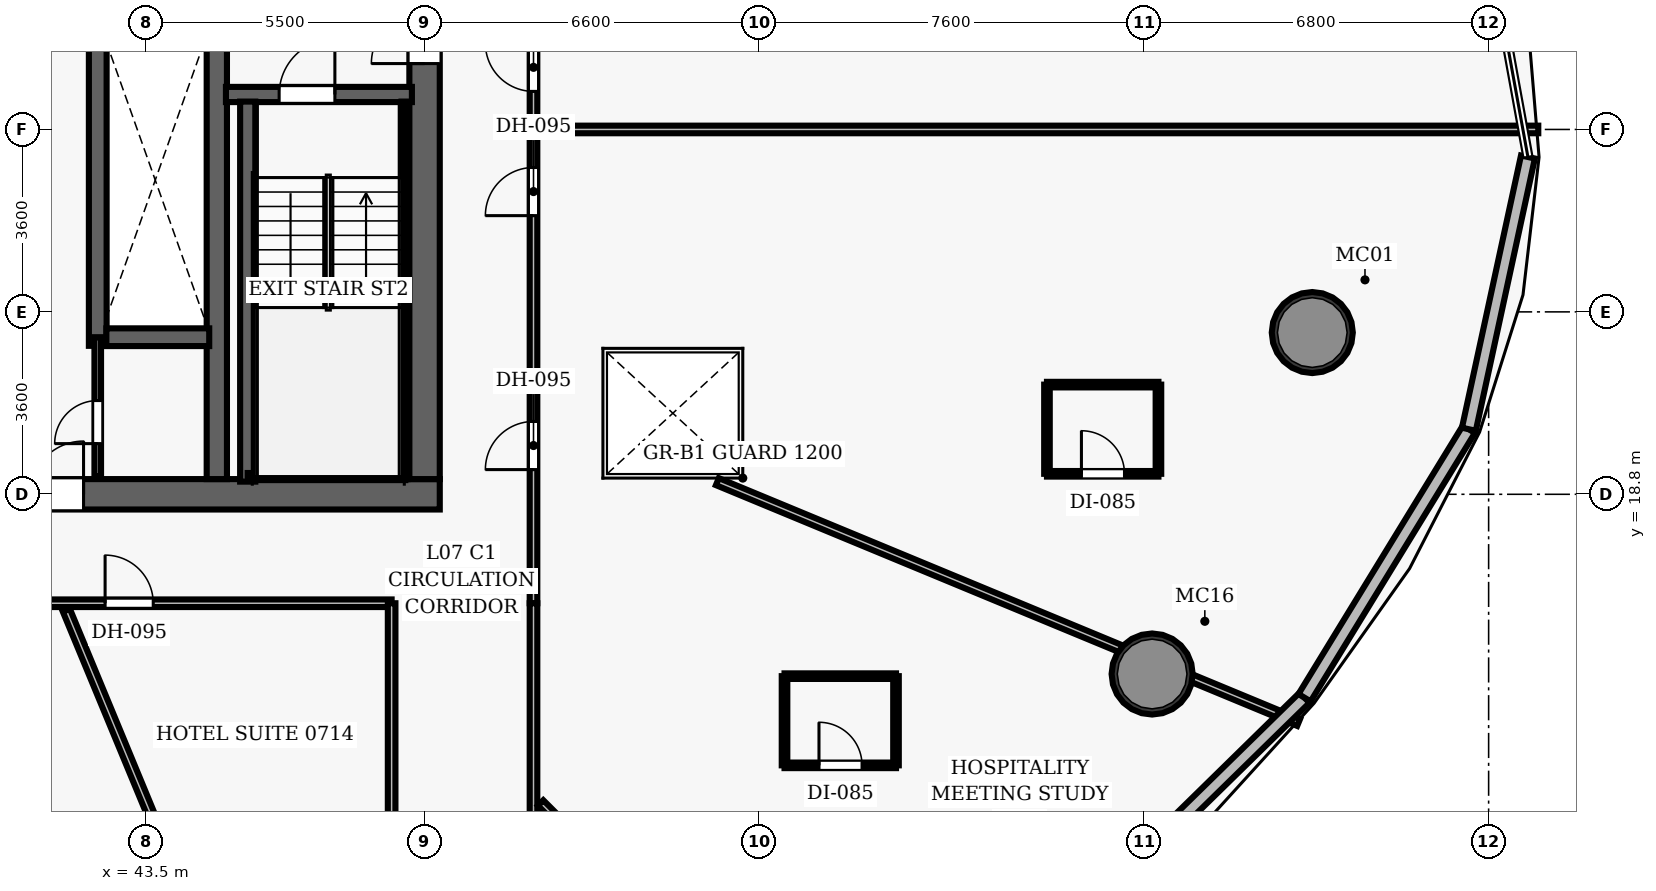
"""IFC4 building model, lengths in metres.
Left out: names, types, materials, properties, quantities, classifications, styles, units other than length and angle.
Written with IfcOpenShell. Run it as: python <this file> out.ifc"""

import sys

from ifc_helpers import new_model, si_unit, direction, frame, frame_2d, origin, origin_2d, place, context, subcontext, project, spatial, rectangle, hollow_circle, extrude, element, fill, save


model = new_model("IFC4")
c1 = context("Model", 3, precision=1e-05, world=origin(), true_north=direction((0.0, 1.0)))
c2 = subcontext(c1, "Body", "Model", "MODEL_VIEW")
j1 = project(units=[si_unit("LENGTHUNIT", "METRE"), si_unit("PLANEANGLEUNIT", "RADIAN")], contexts=[c1])
p1 = place(None, origin())
s1 = spatial("IfcSite", under=j1, at=p1, CompositionType="ELEMENT")
p2 = place(p1, origin())
s2 = spatial("IfcBuilding", under=s1, at=p2, CompositionType="ELEMENT")
p3 = place(p2, frame((0.0, 0.0, 41.4)))
s3 = spatial("IfcBuildingStorey", under=s2, at=p3, CompositionType="ELEMENT", Elevation=41.4)
p4 = place(p3, frame((26.7, 18.8, 0.0), z_axis=(0.0, 0.0, 1.0), x_axis=(1.0, 0.0, 0.0)))
e1 = element("IfcWall", 1, at=p4, inside=s3, PredefinedType="SHEAR", context=c2, shape_type="SweptSolid", body=[
    extrude(rectangle(XDim=22.6, YDim=0.6, at=frame_2d((11.3, 0.0))), origin(), (0.0, 0.0, 1.0), 3.5),
])
p5 = place(p4, frame((14.52, 0.0, 0.0)))
e2 = element("IfcOpeningElement", 2, at=p5, cuts=e1, PredefinedType="OPENING", context=c2, shape_type="SweptSolid", body=[
    extrude(rectangle(XDim=1.05, YDim=2.15, at=frame_2d((0.525, 1.075))), frame((0.0, 0.31, 0.0), z_axis=(0.0, -1.0, 0.0), x_axis=(1.0, 0.0, 0.0)), (0.0, 0.0, 1.0), 0.62),
])
p6 = place(p3, frame((49.0, 19.1, 0.0), z_axis=(0.0, 0.0, 1.0), x_axis=(0.0, 1.0, 0.0)))
e3 = element("IfcWall", 3, at=p6, inside=s3, PredefinedType="SHEAR", context=c2, shape_type="SweptSolid", body=[
    extrude(rectangle(XDim=13.8, YDim=0.6, at=frame_2d((6.9, 0.0))), origin(), (0.0, 0.0, 1.0), 3.5),
])
p7 = place(p6, frame((8.2, 0.0, 0.0)))
e4 = element("IfcOpeningElement", 4, at=p7, cuts=e3, PredefinedType="OPENING", context=c2, shape_type="SweptSolid", body=[
    extrude(rectangle(XDim=1.05, YDim=2.15, at=frame_2d((0.525, 1.075))), frame((0.0, 0.31, 0.0), z_axis=(0.0, -1.0, 0.0), x_axis=(1.0, 0.0, 0.0)), (0.0, 0.0, 1.0), 0.62),
])
p8 = place(p3, frame((44.9, 19.1, 0.0), z_axis=(0.0, 0.0, 1.0), x_axis=(0.0, 1.0, 0.0)))
e5 = element("IfcWall", 5, at=p8, inside=s3, PredefinedType="SHEAR", context=c2, shape_type="SweptSolid", body=[
    extrude(rectangle(XDim=13.8, YDim=0.4, at=frame_2d((6.9, 0.0))), origin(), (0.0, 0.0, 1.0), 3.5),
])
for number, where, z_axis, x_axis in (
    (6, (66.52, 21.992, 0.0), (0.0, 0.0, 1.0), (1.0, 0.0, 0.0)),
    (7, (63.359, 15.254, 0.0), (0.0, 0.0, 1.0), (1.0, 0.0, 0.0)),
):
    element("IfcColumn", number, at=place(p3, frame(where, z_axis=z_axis, x_axis=x_axis)), inside=s3, PredefinedType="COLUMN", context=c2, shape_type="SweptSolid", body=[
        extrude(hollow_circle(Radius=0.8, WallThickness=0.06, at=origin_2d()), origin(), (0.0, 0.0, 1.0), 3.5),
    ])
p9 = place(p3, frame((45.08, 26.69, 0.0), z_axis=(0.0, 0.0, 1.0), x_axis=(1.0, 0.0, 0.0)))
e8 = element("IfcWall", 8, at=p9, inside=s3, PredefinedType="SHEAR", context=c2, shape_type="SweptSolid", body=[
    extrude(rectangle(XDim=3.67, YDim=0.3, at=frame_2d((1.835, 0.0))), origin(), (0.0, 0.0, 1.0), 3.5),
])
p10 = place(p9, frame((1.05, 0.0, 0.0)))
e9 = element("IfcOpeningElement", 9, at=p10, cuts=e8, PredefinedType="OPENING", context=c2, shape_type="SweptSolid", body=[
    extrude(rectangle(XDim=1.1, YDim=2.15, at=frame_2d((0.55, 1.075))), frame((0.0, 0.16, 0.0), z_axis=(0.0, -1.0, 0.0), x_axis=(1.0, 0.0, 0.0)), (0.0, 0.0, 1.0), 0.32),
])
p11 = place(p3, frame((45.51, 19.05, 0.0), z_axis=(0.0, 0.0, 1.0), x_axis=(0.0, 1.0, 0.0)))
e10 = element("IfcWall", 10, at=p11, inside=s3, PredefinedType="SHEAR", context=c2, shape_type="SweptSolid", body=[
    extrude(rectangle(XDim=7.5, YDim=0.3, at=frame_2d((3.75, 0.0))), origin(), (0.0, 0.0, 1.0), 3.5),
])
p12 = place(p3, frame((48.605, 19.1, 0.0), z_axis=(0.0, 0.0, 1.0), x_axis=(0.0, 1.0, 0.0)))
e11 = element("IfcWall", 11, at=p12, inside=s3, PredefinedType="SHEAR", context=c2, shape_type="SweptSolid", body=[
    extrude(rectangle(XDim=7.45, YDim=0.12, at=frame_2d((3.725, 0.0))), origin(), (0.0, 0.0, 1.0), 3.5),
])
p13 = place(p3, frame((45.51, 19.16, 0.0), z_axis=(0.0, 0.0, 1.0), x_axis=(1.0, 0.0, 0.0)))
e12 = element("IfcWall", 12, at=p13, inside=s3, PredefinedType="SHEAR", context=c2, shape_type="SweptSolid", body=[
    extrude(rectangle(XDim=3.095, YDim=0.12, at=frame_2d((1.547, 0.0))), origin(), (0.0, 0.0, 1.0), 3.5),
])
p14 = place(p3, frame((42.55, 21.73, 0.0), z_axis=(0.0, 0.0, 1.0), x_axis=(0.0, 1.0, 0.0)))
e13 = element("IfcWall", 13, at=p14, inside=s3, PredefinedType="SHEAR", context=c2, shape_type="SweptSolid", body=[
    extrude(rectangle(XDim=6.54, YDim=0.35, at=frame_2d((3.27, 0.0))), origin(), (0.0, 0.0, 1.0), 2.6),
])
p15 = place(p3, frame((42.72, 21.9, 0.0), z_axis=(0.0, 0.0, 1.0), x_axis=(1.0, 0.0, 0.0)))
e14 = element("IfcWall", 14, at=p15, inside=s3, PredefinedType="SHEAR", context=c2, shape_type="SweptSolid", body=[
    extrude(rectangle(XDim=2.03, YDim=0.35, at=frame_2d((1.015, 0.0))), origin(), (0.0, 0.0, 1.0), 2.6),
])
p16 = place(p3, frame((42.55, 19.15, 0.0), z_axis=(0.0, 0.0, 1.0), x_axis=(0.0, 1.0, 0.0)))
e15 = element("IfcWall", 15, at=p16, inside=s3, PredefinedType="PARTITIONING", context=c2, shape_type="SweptSolid", body=[
    extrude(rectangle(XDim=2.75, YDim=0.13, at=frame_2d((1.375, 0.0))), origin(), (0.0, 0.0, 1.0), 2.6),
])
p17 = place(p16, frame((0.65, 0.0, 0.0)))
e16 = element("IfcOpeningElement", 16, at=p17, cuts=e15, PredefinedType="OPENING", context=c2, shape_type="SweptSolid", body=[
    extrude(rectangle(XDim=0.85, YDim=2.1, at=frame_2d((0.425, 1.05))), frame((0.0, 0.075, 0.0), z_axis=(0.0, -1.0, 0.0), x_axis=(1.0, 0.0, 0.0)), (0.0, 0.0, 1.0), 0.15),
])
p18 = place(p3, frame((24.85, 16.65, 0.0), z_axis=(0.0, 0.0, 1.0), x_axis=(1.0, 0.0, 0.0)))
e17 = element("IfcWall", 17, at=p18, inside=s3, PredefinedType="PARTITIONING", context=c2, shape_type="SweptSolid", body=[
    extrude(rectangle(XDim=23.5, YDim=0.15, at=frame_2d((11.75, 0.0))), origin(), (0.0, 0.0, 1.0), 2.6),
])
p19 = place(p18, frame((7.505, 0.0, 0.0)))
e18 = element("IfcOpeningElement", 18, at=p19, cuts=e17, PredefinedType="OPENING", context=c2, shape_type="SweptSolid", body=[
    extrude(rectangle(XDim=0.95, YDim=2.15, at=frame_2d((0.475, 1.075))), frame((0.0, 0.085, 0.0), z_axis=(0.0, -1.0, 0.0), x_axis=(1.0, 0.0, 0.0)), (0.0, 0.0, 1.0), 0.17),
])
p20 = place(p18, frame((11.391, 0.0, 0.0)))
e19 = element("IfcOpeningElement", 19, at=p20, cuts=e17, PredefinedType="OPENING", context=c2, shape_type="SweptSolid", body=[
    extrude(rectangle(XDim=0.95, YDim=2.15, at=frame_2d((0.475, 1.075))), frame((0.0, 0.085, 0.0), z_axis=(0.0, -1.0, 0.0), x_axis=(1.0, 0.0, 0.0)), (0.0, 0.0, 1.0), 0.17),
])
p21 = place(p18, frame((14.636, 0.0, 0.0)))
e20 = element("IfcOpeningElement", 20, at=p21, cuts=e17, PredefinedType="OPENING", context=c2, shape_type="SweptSolid", body=[
    extrude(rectangle(XDim=0.95, YDim=2.15, at=frame_2d((0.475, 1.075))), frame((0.0, 0.085, 0.0), z_axis=(0.0, -1.0, 0.0), x_axis=(1.0, 0.0, 0.0)), (0.0, 0.0, 1.0), 0.17),
])
p22 = place(p18, frame((17.845, 0.0, 0.0)))
e21 = element("IfcOpeningElement", 21, at=p22, cuts=e17, PredefinedType="OPENING", context=c2, shape_type="SweptSolid", body=[
    extrude(rectangle(XDim=0.95, YDim=2.15, at=frame_2d((0.475, 1.075))), frame((0.0, 0.085, 0.0), z_axis=(0.0, -1.0, 0.0), x_axis=(1.0, 0.0, 0.0)), (0.0, 0.0, 1.0), 0.17),
])
p23 = place(p3, frame((51.15, 16.65, 0.0), z_axis=(0.0, 0.0, 1.0), x_axis=(0.0, 1.0, 0.0)))
e22 = element("IfcWall", 22, at=p23, inside=s3, PredefinedType="PARTITIONING", context=c2, shape_type="SweptSolid", body=[
    extrude(rectangle(XDim=15.9, YDim=0.15, at=frame_2d((7.95, 0.0))), origin(), (0.0, 0.0, 1.0), 2.6),
])
p24 = place(p23, frame((10.101, 0.0, 0.0)))
e23 = element("IfcOpeningElement", 23, at=p24, cuts=e22, PredefinedType="OPENING", context=c2, shape_type="SweptSolid", body=[
    extrude(rectangle(XDim=0.95, YDim=2.15, at=frame_2d((0.475, 1.075))), frame((0.0, 0.085, 0.0), z_axis=(0.0, -1.0, 0.0), x_axis=(1.0, 0.0, 0.0)), (0.0, 0.0, 1.0), 0.17),
])
p25 = place(p23, frame((2.637, 0.0, 0.0)))
e24 = element("IfcOpeningElement", 24, at=p25, cuts=e22, PredefinedType="OPENING", context=c2, shape_type="SweptSolid", body=[
    extrude(rectangle(XDim=0.95, YDim=2.15, at=frame_2d((0.475, 1.075))), frame((0.0, 0.085, 0.0), z_axis=(0.0, -1.0, 0.0), x_axis=(1.0, 0.0, 0.0)), (0.0, 0.0, 1.0), 0.17),
])
p26 = place(p23, frame((7.649, 0.0, 0.0)))
e25 = element("IfcOpeningElement", 25, at=p26, cuts=e22, PredefinedType="OPENING", context=c2, shape_type="SweptSolid", body=[
    extrude(rectangle(XDim=0.95, YDim=2.15, at=frame_2d((0.475, 1.075))), frame((0.0, 0.085, 0.0), z_axis=(0.0, -1.0, 0.0), x_axis=(1.0, 0.0, 0.0)), (0.0, 0.0, 1.0), 0.17),
])
for number, where, z_axis, x_axis in (
    (26, (48.35, 6.5, 0.0), (0.0, 0.0, 1.0), (0.0, 1.0, 0.0)),
    (27, (51.15, 6.5, 0.0), (0.0, 0.0, 1.0), (0.0, 1.0, 0.0)),
):
    element("IfcWall", number, at=place(p3, frame(where, z_axis=z_axis, x_axis=x_axis)), inside=s3, PredefinedType="PARTITIONING", context=c2, shape_type="SweptSolid", body=[
        extrude(rectangle(XDim=10.15, YDim=0.15, at=frame_2d((5.075, 0.0))), origin(), (0.0, 0.0, 1.0), 2.6),
    ])
p27 = place(p3, frame((51.29, 26.0, 0.0), z_axis=(0.0, 0.0, 1.0), x_axis=(1.0, 0.0, 0.0)))
e28 = element("IfcWall", 28, at=p27, inside=s3, PredefinedType="PARTITIONING", context=c2, shape_type="SweptSolid", body=[
    extrude(rectangle(XDim=19.69, YDim=0.15, at=frame_2d((9.845, 0.0))), origin(), (0.0, 0.0, 1.0), 2.6),
])
p28 = place(p3, frame((41.931, 16.51, 0.0), z_axis=(0.0, 0.0, 1.0), x_axis=(0.382684118973, -0.923879248109, 0.0)))
e29 = element("IfcWall", 29, at=p28, inside=s3, PredefinedType="PARTITIONING", context=c2, shape_type="SweptSolid", body=[
    extrude(rectangle(XDim=14.988, YDim=0.15, at=frame_2d((7.494, 0.0))), origin(), (0.0, 0.0, 1.0), 2.6),
])
p29 = place(p3, frame((51.29, 12.71, 0.0), z_axis=(0.0, 0.0, 1.0), x_axis=(0.707106781187, -0.707106781187, 0.0)))
e30 = element("IfcWall", 30, at=p29, inside=s3, PredefinedType="PARTITIONING", context=c2, shape_type="SweptSolid", body=[
    extrude(rectangle(XDim=8.426, YDim=0.15, at=frame_2d((4.213, 0.0))), origin(), (0.0, 0.0, 1.0), 2.6),
])
p30 = place(p3, frame((54.779, 19.05, 0.0), z_axis=(0.0, 0.0, 1.0), x_axis=(0.923879997354, -0.382682310133, 0.0)))
e31 = element("IfcWall", 31, at=p30, inside=s3, PredefinedType="PARTITIONING", context=c2, shape_type="SweptSolid", body=[
    extrude(rectangle(XDim=12.417, YDim=0.15, at=frame_2d((6.208, 0.0))), origin(), (0.0, 0.0, 1.0), 2.6),
])
p31 = place(p3, frame((56.104, 13.451, 0.0), z_axis=(0.0, 0.0, 1.0), x_axis=(1.0, 0.0, 0.0)))
e32 = element("IfcWall", 32, at=p31, inside=s3, PredefinedType="PARTITIONING", context=c2, shape_type="SweptSolid", body=[
    extrude(rectangle(XDim=2.2, YDim=0.11, at=frame_2d((1.1, 0.0))), origin(), (0.0, 0.0, 1.0), 2.6),
])
p32 = place(p31, frame((0.68, 0.0, 0.0)))
e33 = element("IfcOpeningElement", 33, at=p32, cuts=e32, PredefinedType="OPENING", context=c2, shape_type="SweptSolid", body=[
    extrude(rectangle(XDim=0.85, YDim=2.1, at=frame_2d((0.425, 1.05))), frame((0.0, 0.065, 0.0), z_axis=(0.0, -1.0, 0.0), x_axis=(1.0, 0.0, 0.0)), (0.0, 0.0, 1.0), 0.13),
])
p33 = place(p3, frame((56.104, 15.211, 0.0), z_axis=(0.0, 0.0, 1.0), x_axis=(1.0, 0.0, 0.0)))
e34 = element("IfcWall", 34, at=p33, inside=s3, PredefinedType="PARTITIONING", context=c2, shape_type="SweptSolid", body=[
    extrude(rectangle(XDim=2.2, YDim=0.11, at=frame_2d((1.1, 0.0))), origin(), (0.0, 0.0, 1.0), 2.6),
])
for number, where, z_axis, x_axis in (
    (35, (56.104, 13.451, 0.0), (0.0, 0.0, 1.0), (0.0, 1.0, 0.0)),
    (36, (58.304, 13.451, 0.0), (0.0, 0.0, 1.0), (0.0, 1.0, 0.0)),
):
    element("IfcWall", number, at=place(p3, frame(where, z_axis=z_axis, x_axis=x_axis)), inside=s3, PredefinedType="PARTITIONING", context=c2, shape_type="SweptSolid", body=[
        extrude(rectangle(XDim=1.76, YDim=0.11, at=frame_2d((0.88, 0.0))), origin(), (0.0, 0.0, 1.0), 2.6),
    ])
p34 = place(p3, frame((61.283, 19.204, 0.0), z_axis=(0.0, 0.0, 1.0), x_axis=(1.0, 0.0, 0.0)))
e37 = element("IfcWall", 37, at=p34, inside=s3, PredefinedType="PARTITIONING", context=c2, shape_type="SweptSolid", body=[
    extrude(rectangle(XDim=2.2, YDim=0.11, at=frame_2d((1.1, 0.0))), origin(), (0.0, 0.0, 1.0), 2.6),
])
p35 = place(p34, frame((0.68, 0.0, 0.0)))
e38 = element("IfcOpeningElement", 38, at=p35, cuts=e37, PredefinedType="OPENING", context=c2, shape_type="SweptSolid", body=[
    extrude(rectangle(XDim=0.85, YDim=2.1, at=frame_2d((0.425, 1.05))), frame((0.0, 0.065, 0.0), z_axis=(0.0, -1.0, 0.0), x_axis=(1.0, 0.0, 0.0)), (0.0, 0.0, 1.0), 0.13),
])
p36 = place(p3, frame((61.283, 20.964, 0.0), z_axis=(0.0, 0.0, 1.0), x_axis=(1.0, 0.0, 0.0)))
e39 = element("IfcWall", 39, at=p36, inside=s3, PredefinedType="PARTITIONING", context=c2, shape_type="SweptSolid", body=[
    extrude(rectangle(XDim=2.2, YDim=0.11, at=frame_2d((1.1, 0.0))), origin(), (0.0, 0.0, 1.0), 2.6),
])
for number, where, z_axis, x_axis in (
    (40, (61.283, 19.204, 0.0), (0.0, 0.0, 1.0), (0.0, 1.0, 0.0)),
    (41, (63.483, 19.204, 0.0), (0.0, 0.0, 1.0), (0.0, 1.0, 0.0)),
):
    element("IfcWall", number, at=place(p3, frame(where, z_axis=z_axis, x_axis=x_axis)), inside=s3, PredefinedType="PARTITIONING", context=c2, shape_type="SweptSolid", body=[
        extrude(rectangle(XDim=1.76, YDim=0.11, at=frame_2d((0.88, 0.0))), origin(), (0.0, 0.0, 1.0), 2.6),
    ])
p37 = place(p3, frame((66.367, 14.786, 0.0), z_axis=(0.0, 0.0, 1.0), x_axis=(-0.714332776808, -0.699806176007, 0.0)))
e42 = element("IfcWall", 42, at=p37, inside=s3, PredefinedType="SOLIDWALL", context=c2, shape_type="SweptSolid", body=[
    extrude(rectangle(XDim=7.143, YDim=0.28, at=frame_2d((3.571, 0.0))), origin(), (0.0, 0.0, 1.0), 3.25),
])
p38 = place(p3, frame((69.61, 20.084, 0.0), z_axis=(0.0, 0.0, 1.0), x_axis=(-0.522041260758, -0.852920231948, 0.0)))
e43 = element("IfcWall", 43, at=p38, inside=s3, PredefinedType="SOLIDWALL", context=c2, shape_type="SweptSolid", body=[
    extrude(rectangle(XDim=6.212, YDim=0.28, at=frame_2d((3.106, 0.0))), origin(), (0.0, 0.0, 1.0), 3.25),
])
p39 = place(p3, frame((70.775, 25.457, 0.0), z_axis=(0.0, 0.0, 1.0), x_axis=(-0.211966847204, -0.977276857235, 0.0)))
e44 = element("IfcWall", 44, at=p39, inside=s3, PredefinedType="SOLIDWALL", context=c2, shape_type="SweptSolid", body=[
    extrude(rectangle(XDim=5.498, YDim=0.28, at=frame_2d((2.749, 0.0))), origin(), (0.0, 0.0, 1.0), 3.25),
])
p40 = place(p10, origin())
e45 = element("IfcDoor", 45, at=p40, inside=s3, OperationType="SINGLE_SWING_RIGHT", PredefinedType="DOOR", context=c2, shape_type="SweptSolid", body=[
    extrude(rectangle(XDim=1.1, YDim=2.15, at=frame_2d((0.55, 1.075))), frame((0.0, 0.025, 0.0), z_axis=(0.0, -1.0, 0.0), x_axis=(1.0, 0.0, 0.0)), (0.0, 0.0, 1.0), 0.05),
])
fill(e9, e45)
p41 = place(p7, origin())
e46 = element("IfcDoor", 46, at=p41, inside=s3, OperationType="SINGLE_SWING_LEFT", PredefinedType="DOOR", context=c2, shape_type="SweptSolid", body=[
    extrude(rectangle(XDim=1.05, YDim=2.15, at=frame_2d((0.525, 1.075))), frame((0.0, 0.025, 0.0), z_axis=(0.0, -1.0, 0.0), x_axis=(1.0, 0.0, 0.0)), (0.0, 0.0, 1.0), 0.05),
])
fill(e4, e46)
p42 = place(p5, origin())
e47 = element("IfcDoor", 47, at=p42, inside=s3, OperationType="SINGLE_SWING_RIGHT", PredefinedType="DOOR", context=c2, shape_type="SweptSolid", body=[
    extrude(rectangle(XDim=1.05, YDim=2.15, at=frame_2d((0.525, 1.075))), frame((0.0, 0.025, 0.0), z_axis=(0.0, -1.0, 0.0), x_axis=(1.0, 0.0, 0.0)), (0.0, 0.0, 1.0), 0.05),
])
fill(e2, e47)
p43 = place(p17, origin())
e48 = element("IfcDoor", 48, at=p43, inside=s3, OperationType="SINGLE_SWING_LEFT", PredefinedType="DOOR", context=c2, shape_type="SweptSolid", body=[
    extrude(rectangle(XDim=0.85, YDim=2.1, at=frame_2d((0.425, 1.05))), frame((0.0, 0.025, 0.0), z_axis=(0.0, -1.0, 0.0), x_axis=(1.0, 0.0, 0.0)), (0.0, 0.0, 1.0), 0.05),
])
fill(e16, e48)
p44 = place(p24, origin())
e49 = element("IfcDoor", 49, at=p44, inside=s3, OperationType="SINGLE_SWING_RIGHT", PredefinedType="DOOR", context=c2, shape_type="SweptSolid", body=[
    extrude(rectangle(XDim=0.95, YDim=2.15, at=frame_2d((0.475, 1.075))), frame((0.0, 0.025, 0.0), z_axis=(0.0, -1.0, 0.0), x_axis=(1.0, 0.0, 0.0)), (0.0, 0.0, 1.0), 0.05),
])
fill(e23, e49)
p45 = place(p22, origin())
e50 = element("IfcDoor", 50, at=p45, inside=s3, OperationType="SINGLE_SWING_LEFT", PredefinedType="DOOR", context=c2, shape_type="SweptSolid", body=[
    extrude(rectangle(XDim=0.95, YDim=2.15, at=frame_2d((0.475, 1.075))), frame((0.0, 0.025, 0.0), z_axis=(0.0, -1.0, 0.0), x_axis=(1.0, 0.0, 0.0)), (0.0, 0.0, 1.0), 0.05),
])
fill(e21, e50)
p46 = place(p25, origin())
e51 = element("IfcDoor", 51, at=p46, inside=s3, OperationType="SINGLE_SWING_LEFT", PredefinedType="DOOR", context=c2, shape_type="SweptSolid", body=[
    extrude(rectangle(XDim=0.95, YDim=2.15, at=frame_2d((0.475, 1.075))), frame((0.0, 0.025, 0.0), z_axis=(0.0, -1.0, 0.0), x_axis=(1.0, 0.0, 0.0)), (0.0, 0.0, 1.0), 0.05),
])
fill(e24, e51)
p47 = place(p32, origin())
e52 = element("IfcDoor", 52, at=p47, inside=s3, OperationType="SINGLE_SWING_LEFT", PredefinedType="DOOR", context=c2, shape_type="SweptSolid", body=[
    extrude(rectangle(XDim=0.85, YDim=2.1, at=frame_2d((0.425, 1.05))), frame((0.0, 0.025, 0.0), z_axis=(0.0, -1.0, 0.0), x_axis=(1.0, 0.0, 0.0)), (0.0, 0.0, 1.0), 0.05),
])
fill(e33, e52)
p48 = place(p26, origin())
e53 = element("IfcDoor", 53, at=p48, inside=s3, OperationType="SINGLE_SWING_LEFT", PredefinedType="DOOR", context=c2, shape_type="SweptSolid", body=[
    extrude(rectangle(XDim=0.95, YDim=2.15, at=frame_2d((0.475, 1.075))), frame((0.0, 0.025, 0.0), z_axis=(0.0, -1.0, 0.0), x_axis=(1.0, 0.0, 0.0)), (0.0, 0.0, 1.0), 0.05),
])
fill(e25, e53)
p49 = place(p35, origin())
e54 = element("IfcDoor", 54, at=p49, inside=s3, OperationType="SINGLE_SWING_LEFT", PredefinedType="DOOR", context=c2, shape_type="SweptSolid", body=[
    extrude(rectangle(XDim=0.85, YDim=2.1, at=frame_2d((0.425, 1.05))), frame((0.0, 0.025, 0.0), z_axis=(0.0, -1.0, 0.0), x_axis=(1.0, 0.0, 0.0)), (0.0, 0.0, 1.0), 0.05),
])
fill(e38, e54)
save(model, sys.argv[1])
